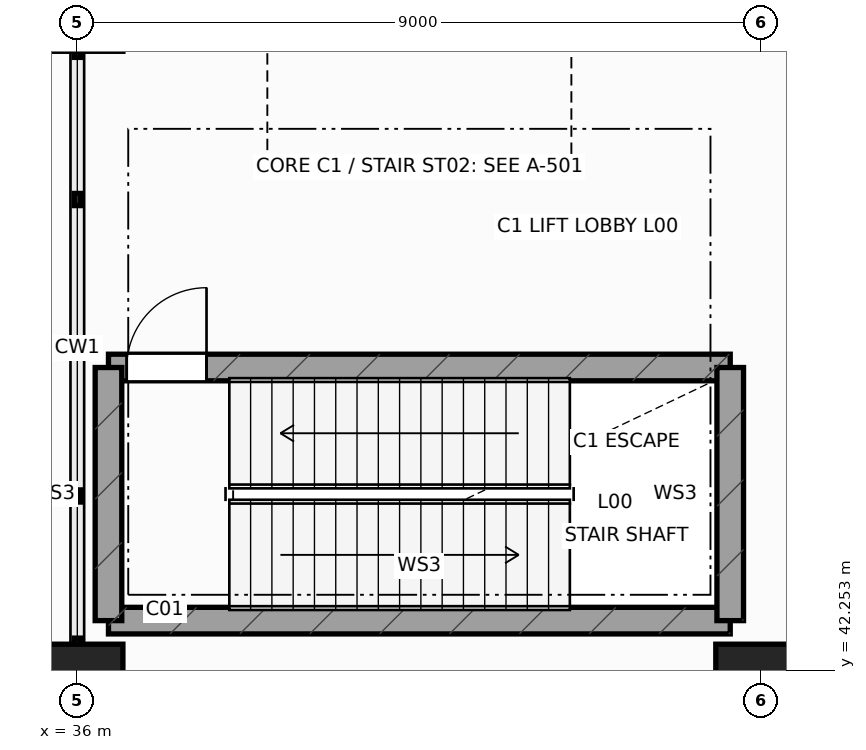
"""IFC4 building model, lengths in metres.
Left out: names, types, materials, properties, quantities, classifications, styles, units other than length and angle.
Written with IfcOpenShell. Run it as: python <this file> out.ifc"""

import sys

from ifc_helpers import new_model, si_unit, direction, frame, frame_2d, origin, origin_2d, place, context, subcontext, project, spatial, rectangle, extrude, element, fill, save


model = new_model("IFC4")
c1 = context("Model", 3, precision=1e-05, world=origin(), true_north=direction((0.0, 1.0)))
c2 = subcontext(c1, "Body", "Model", "MODEL_VIEW")
j1 = project(units=[si_unit("LENGTHUNIT", "METRE"), si_unit("PLANEANGLEUNIT", "RADIAN")], contexts=[c1])
p1 = place(None, origin())
s1 = spatial("IfcSite", under=j1, at=p1, CompositionType="ELEMENT")
p2 = place(p1, origin())
s2 = spatial("IfcBuilding", under=s1, at=p2, CompositionType="ELEMENT")
p3 = place(p2, origin())
s3 = spatial("IfcBuildingStorey", under=s2, at=p3, CompositionType="ELEMENT", Elevation=0.0)
for number, where, z_axis, x_axis in (
    (1, (36.0, 42.0, 0.0), (0.0, 0.0, 1.0), (1.0, 0.0, 0.0)),
    (2, (45.0, 42.0, 0.0), (0.0, 0.0, 1.0), (1.0, 0.0, 0.0)),
):
    element("IfcColumn", number, at=place(p3, frame(where, z_axis=z_axis, x_axis=x_axis)), inside=s3, PredefinedType="COLUMN", context=c2, shape_type="SweptSolid", body=[
        extrude(rectangle(XDim=1.2, YDim=1.2, at=origin_2d()), origin(), (0.0, 0.0, 1.0), 6.0),
    ])
p4 = place(p3, frame((36.41, 42.91, 0.0), z_axis=(0.0, 0.0, 1.0), x_axis=(1.0, 0.0, 0.0)))
e3 = element("IfcWall", 3, at=p4, inside=s3, PredefinedType="SHEAR", context=c2, shape_type="SweptSolid", body=[
    extrude(rectangle(XDim=8.18, YDim=0.35, at=frame_2d((4.09, 0.0))), origin(), (0.0, 0.0, 1.0), 5.7),
])
p5 = place(p3, frame((36.41, 46.24, 0.0), z_axis=(0.0, 0.0, 1.0), x_axis=(1.0, 0.0, 0.0)))
e4 = element("IfcWall", 4, at=p5, inside=s3, PredefinedType="SHEAR", context=c2, shape_type="SweptSolid", body=[
    extrude(rectangle(XDim=8.18, YDim=0.35, at=frame_2d((4.09, 0.0))), origin(), (0.0, 0.0, 1.0), 5.7),
])
p6 = place(p5, frame((0.24, 0.0, 0.0)))
e5 = element("IfcOpeningElement", 5, at=p6, cuts=e4, PredefinedType="OPENING", context=c2, shape_type="SweptSolid", body=[
    extrude(rectangle(XDim=1.05, YDim=2.18, at=frame_2d((0.525, 1.09))), frame((0.0, 0.185, 0.0), z_axis=(0.0, -1.0, 0.0), x_axis=(1.0, 0.0, 0.0)), (0.0, 0.0, 1.0), 0.37),
])
for number, where, z_axis, x_axis in (
    (6, (36.41, 42.91, 0.0), (0.0, 0.0, 1.0), (0.0, 1.0, 0.0)),
    (7, (44.59, 42.91, 0.0), (0.0, 0.0, 1.0), (0.0, 1.0, 0.0)),
):
    element("IfcWall", number, at=place(p3, frame(where, z_axis=z_axis, x_axis=x_axis)), inside=s3, PredefinedType="SHEAR", context=c2, shape_type="SweptSolid", body=[
        extrude(rectangle(XDim=3.33, YDim=0.35, at=frame_2d((1.665, 0.0))), origin(), (0.0, 0.0, 1.0), 5.7),
    ])
p7 = place(p6, origin())
e8 = element("IfcDoor", 8, at=p7, inside=s3, OperationType="SINGLE_SWING_RIGHT", PredefinedType="DOOR", context=c2, shape_type="SweptSolid", body=[
    extrude(rectangle(XDim=1.05, YDim=2.18, at=frame_2d((0.525, 1.09))), frame((0.0, 0.025, 0.0), z_axis=(0.0, -1.0, 0.0), x_axis=(1.0, 0.0, 0.0)), (0.0, 0.0, 1.0), 0.05),
])
fill(e5, e8)
save(model, sys.argv[1])
